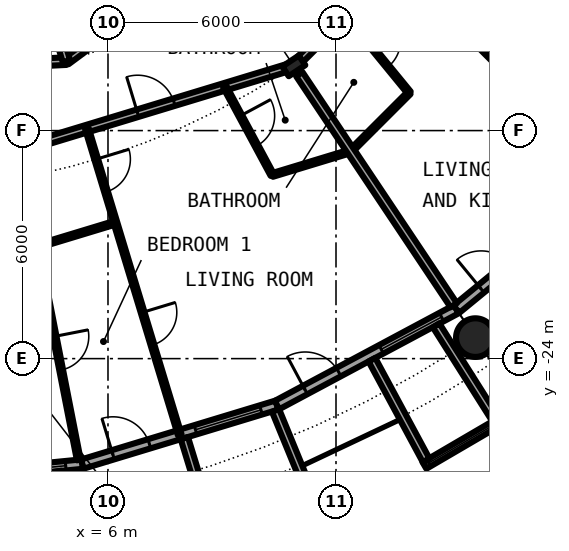
"""IFC4 building model, lengths in metres.
Left out: names, types, materials, properties, quantities, classifications, styles, units other than length and angle.
Written with IfcOpenShell. Run it as: python <this file> out.ifc"""

import sys

from ifc_helpers import new_model, si_unit, direction, frame, frame_2d, origin, origin_2d, place, context, subcontext, project, spatial, rectangle, circle, hollow_circle, i_section, extrude, element, fill, save


model = new_model("IFC4")
c1 = context("Model", 3, precision=1e-05, world=origin(), true_north=direction((0.0, 1.0)))
c2 = subcontext(c1, "Body", "Model", "MODEL_VIEW")
j1 = project(units=[si_unit("LENGTHUNIT", "METRE"), si_unit("PLANEANGLEUNIT", "RADIAN")], contexts=[c1])
p1 = place(None, origin())
s1 = spatial("IfcSite", under=j1, at=p1, CompositionType="ELEMENT")
p2 = place(p1, origin())
s2 = spatial("IfcBuilding", under=s1, at=p2, CompositionType="ELEMENT")
p3 = place(p2, frame((0.0, 0.0, 88.0)))
s3 = spatial("IfcBuildingStorey", under=s2, at=p3, CompositionType="ELEMENT", Elevation=88.0)
p4 = place(p3, frame((15.667, -23.448, 0.0), z_axis=(0.0, 0.0, 1.0), x_axis=(1.0, 0.0, 0.0)))
e1 = element("IfcColumn", 1, at=p4, inside=s3, PredefinedType="COLUMN", context=c2, shape_type="SweptSolid", body=[
    extrude(hollow_circle(Radius=0.508, WallThickness=0.04, at=origin_2d()), origin(), (0.0, 0.0, 1.0), 3.05),
])
p5 = place(p3, frame((10.889, -16.297, 0.0), z_axis=(0.0, 0.0, 1.0), x_axis=(0.55557023302, -0.831469612303, 0.0)))
e2 = element("IfcColumn", 2, at=p5, inside=s3, PredefinedType="COLUMN", context=c2, shape_type="SweptSolid", body=[
    extrude(i_section(OverallWidth=0.306, OverallDepth=0.524, WebThickness=0.021, FlangeThickness=0.04, FilletRadius=0.027, at=origin_2d()), origin(), (0.0, 0.0, 1.0), 3.05),
])
p6 = place(p3, frame((0.0, -27.3, 0.0), z_axis=(0.0, 0.0, 1.0), x_axis=(0.995173996315, 0.098126026407, 0.0)))
e3 = element("IfcWall", 3, at=p6, inside=s3, PredefinedType="SOLIDWALL", context=c2, shape_type="SweptSolid", body=[
    extrude(rectangle(XDim=5.352, YDim=0.25, at=frame_2d((2.676, 0.0))), origin(), (0.0, 0.0, 1.0), 2.7),
])
p7 = place(p6, frame((0.841, 0.0, 0.0)))
e4 = element("IfcOpeningElement", 4, at=p7, cuts=e3, PredefinedType="OPENING", context=c2, shape_type="SweptSolid", body=[
    extrude(rectangle(XDim=1.0, YDim=2.2, at=frame_2d((0.5, 1.1))), frame((0.0, 0.135, 0.0), z_axis=(0.0, -1.0, 0.0), x_axis=(1.0, 0.0, 0.0)), (0.0, 0.0, 1.0), 0.27),
])
p8 = place(p6, frame((3.111, 0.0, 0.3)))
e5 = element("IfcOpeningElement", 5, at=p8, cuts=e3, PredefinedType="OPENING", context=c2, shape_type="SweptSolid", body=[
    extrude(rectangle(XDim=1.8, YDim=2.1, at=frame_2d((0.9, 1.05))), frame((0.0, 0.135, 0.0), z_axis=(0.0, -1.0, 0.0), x_axis=(1.0, 0.0, 0.0)), (0.0, 0.0, 1.0), 0.27),
])
p9 = place(p3, frame((4.671, -26.966, -0.03), z_axis=(0.0, 0.0, 1.0), x_axis=(0.170539878907, -0.985350774954, 0.0)))
e6 = element("IfcWall", 6, at=p9, inside=s3, PredefinedType="SOLIDWALL", context=c2, shape_type="SweptSolid", body=[
    extrude(rectangle(XDim=2.932, YDim=0.2, at=frame_2d((1.466, 0.0))), origin(), (0.0, 0.0, 1.0), 2.73),
])
p10 = place(p3, frame((5.326, -26.775, 0.0), z_axis=(0.0, 0.0, 1.0), x_axis=(0.956965678721, 0.290201119486, 0.0)))
e7 = element("IfcWall", 7, at=p10, inside=s3, PredefinedType="SOLIDWALL", context=c2, shape_type="SweptSolid", body=[
    extrude(rectangle(XDim=5.351, YDim=0.25, at=frame_2d((2.676, 0.0))), origin(), (0.0, 0.0, 1.0), 2.7),
])
p11 = place(p10, frame((0.841, 0.0, 0.0)))
e8 = element("IfcOpeningElement", 8, at=p11, cuts=e7, PredefinedType="OPENING", context=c2, shape_type="SweptSolid", body=[
    extrude(rectangle(XDim=1.0, YDim=2.2, at=frame_2d((0.5, 1.1))), frame((0.0, 0.135, 0.0), z_axis=(0.0, -1.0, 0.0), x_axis=(1.0, 0.0, 0.0)), (0.0, 0.0, 1.0), 0.27),
])
p12 = place(p10, frame((3.111, 0.0, 0.3)))
e9 = element("IfcOpeningElement", 9, at=p12, cuts=e7, PredefinedType="OPENING", context=c2, shape_type="SweptSolid", body=[
    extrude(rectangle(XDim=1.8, YDim=2.1, at=frame_2d((0.9, 1.05))), frame((0.0, 0.135, 0.0), z_axis=(0.0, -1.0, 0.0), x_axis=(1.0, 0.0, 0.0)), (0.0, 0.0, 1.0), 0.27),
])
p13 = place(p3, frame((8.009, -26.092, -0.03), z_axis=(0.0, 0.0, 1.0), x_axis=(0.293406695073, -0.955987715029, 0.0)))
e10 = element("IfcWall", 10, at=p13, inside=s3, PredefinedType="SOLIDWALL", context=c2, shape_type="SweptSolid", body=[
    extrude(rectangle(XDim=3.006, YDim=0.2, at=frame_2d((1.503, 0.0))), origin(), (0.0, 0.0, 1.0), 2.73),
])
p14 = place(p3, frame((10.409, -25.364, -0.03), z_axis=(0.0, 0.0, 1.0), x_axis=(0.379509886562, -0.925187681501, 0.0)))
e11 = element("IfcWall", 11, at=p14, inside=s3, PredefinedType="SOLIDWALL", context=c2, shape_type="SweptSolid", body=[
    extrude(rectangle(XDim=2.883, YDim=0.2, at=frame_2d((1.441, 0.0))), origin(), (0.0, 0.0, 1.0), 2.73),
])
p15 = place(p3, frame((10.447, -25.222, 0.0), z_axis=(0.0, 0.0, 1.0), x_axis=(0.881915646801, 0.471407246368, 0.0)))
e12 = element("IfcWall", 12, at=p15, inside=s3, PredefinedType="SOLIDWALL", context=c2, shape_type="SweptSolid", body=[
    extrude(rectangle(XDim=5.352, YDim=0.25, at=frame_2d((2.676, 0.0))), origin(), (0.0, 0.0, 1.0), 2.7),
])
p16 = place(p15, frame((0.841, 0.0, 0.0)))
e13 = element("IfcOpeningElement", 13, at=p16, cuts=e12, PredefinedType="OPENING", context=c2, shape_type="SweptSolid", body=[
    extrude(rectangle(XDim=1.0, YDim=2.2, at=frame_2d((0.5, 1.1))), frame((0.0, 0.135, 0.0), z_axis=(0.0, -1.0, 0.0), x_axis=(1.0, 0.0, 0.0)), (0.0, 0.0, 1.0), 0.27),
])
p17 = place(p15, frame((3.111, 0.0, 0.3)))
e14 = element("IfcOpeningElement", 14, at=p17, cuts=e12, PredefinedType="OPENING", context=c2, shape_type="SweptSolid", body=[
    extrude(rectangle(XDim=1.8, YDim=2.1, at=frame_2d((0.9, 1.05))), frame((0.0, 0.135, 0.0), z_axis=(0.0, -1.0, 0.0), x_axis=(1.0, 0.0, 0.0)), (0.0, 0.0, 1.0), 0.27),
])
p18 = place(p3, frame((14.327, -26.812, -0.03), z_axis=(0.0, 0.0, 1.0), x_axis=(0.863346521872, 0.504611517081, 0.0)))
e15 = element("IfcWall", 15, at=p18, inside=s3, PredefinedType="SOLIDWALL", context=c2, shape_type="SweptSolid", body=[
    extrude(rectangle(XDim=2.336, YDim=0.2, at=frame_2d((1.168, 0.0))), origin(), (0.0, 0.0, 1.0), 2.73),
])
p19 = place(p18, frame((0.128, 0.0, 0.33)))
e16 = element("IfcOpeningElement", 16, at=p19, cuts=e15, PredefinedType="OPENING", context=c2, shape_type="SweptSolid", body=[
    extrude(circle(Radius=1.04, at=frame_2d((1.04, 1.04))), frame((0.0, 0.11, 0.0), z_axis=(0.0, -1.0, 0.0), x_axis=(1.0, 0.0, 0.0)), (0.0, 0.0, 1.0), 0.22),
])
p20 = place(p3, frame((12.945, -24.029, -0.03), z_axis=(0.0, 0.0, 1.0), x_axis=(0.474424310775, -0.88029629861, 0.0)))
e17 = element("IfcWall", 17, at=p20, inside=s3, PredefinedType="SOLIDWALL", context=c2, shape_type="SweptSolid", body=[
    extrude(rectangle(XDim=3.006, YDim=0.2, at=frame_2d((1.503, 0.0))), origin(), (0.0, 0.0, 1.0), 2.73),
])
p21 = place(p3, frame((14.635, -23.126, -0.03), z_axis=(0.0, 0.0, 1.0), x_axis=(0.534437802731, -0.845207805816, 0.0)))
e18 = element("IfcWall", 18, at=p21, inside=s3, PredefinedType="SOLIDWALL", context=c2, shape_type="SweptSolid", body=[
    extrude(rectangle(XDim=2.932, YDim=0.2, at=frame_2d((1.466, 0.0))), origin(), (0.0, 0.0, 1.0), 2.73),
])
p22 = place(p3, frame((15.167, -22.699, 0.0), z_axis=(0.0, 0.0, 1.0), x_axis=(0.773019449054, 0.634382322723, 0.0)))
e19 = element("IfcWall", 19, at=p22, inside=s3, PredefinedType="SOLIDWALL", context=c2, shape_type="SweptSolid", body=[
    extrude(rectangle(XDim=5.352, YDim=0.25, at=frame_2d((2.676, 0.0))), origin(), (0.0, 0.0, 1.0), 2.7),
])
p23 = place(p22, frame((0.841, 0.0, 0.0)))
e20 = element("IfcOpeningElement", 20, at=p23, cuts=e19, PredefinedType="OPENING", context=c2, shape_type="SweptSolid", body=[
    extrude(rectangle(XDim=1.0, YDim=2.2, at=frame_2d((0.5, 1.1))), frame((0.0, 0.135, 0.0), z_axis=(0.0, -1.0, 0.0), x_axis=(1.0, 0.0, 0.0)), (0.0, 0.0, 1.0), 0.27),
])
p24 = place(p22, frame((3.111, 0.0, 0.3)))
e21 = element("IfcOpeningElement", 21, at=p24, cuts=e19, PredefinedType="OPENING", context=c2, shape_type="SweptSolid", body=[
    extrude(rectangle(XDim=1.8, YDim=2.1, at=frame_2d((0.9, 1.05))), frame((0.0, 0.135, 0.0), z_axis=(0.0, -1.0, 0.0), x_axis=(1.0, 0.0, 0.0)), (0.0, 0.0, 1.0), 0.27),
])
p25 = place(p3, frame((12.389, -18.542, 0.0), z_axis=(0.0, 0.0, 1.0), x_axis=(0.707106781187, 0.707106781187, 0.0)))
e22 = element("IfcWall", 22, at=p25, inside=s3, PredefinedType="PARTITIONING", context=c2, shape_type="SweptSolid", body=[
    extrude(rectangle(XDim=2.175, YDim=0.1, at=frame_2d((1.088, 0.0))), origin(), (0.0, 0.0, 1.0), 2.7),
])
p26 = place(p3, frame((0.0, -22.3, 0.0), z_axis=(0.0, 0.0, 1.0), x_axis=(0.956940987612, 0.290282528286, 0.0)))
e23 = element("IfcWall", 23, at=p26, inside=s3, PredefinedType="PARTITIONING", context=c2, shape_type="SweptSolid", body=[
    extrude(rectangle(XDim=6.477, YDim=0.1, at=frame_2d((3.238, 0.0))), origin(), (0.0, 0.0, 1.0), 2.7),
])
p27 = place(p3, frame((10.327, -19.168, 0.0), z_axis=(0.0, 0.0, 1.0), x_axis=(0.956877769253, 0.290490851335, 0.0)))
e24 = element("IfcWall", 24, at=p27, inside=s3, PredefinedType="PARTITIONING", context=c2, shape_type="SweptSolid", body=[
    extrude(rectangle(XDim=2.158, YDim=0.1, at=frame_2d((1.079, 0.0))), origin(), (0.0, 0.0, 1.0), 2.7),
])
p28 = place(p3, frame((11.0, -16.186, 0.0), z_axis=(0.0, 0.0, 1.0), x_axis=(0.707106781187, 0.707106781187, 0.0)))
e25 = element("IfcWall", 25, at=p28, inside=s3, PredefinedType="PARTITIONING", context=c2, shape_type="SweptSolid", body=[
    extrude(rectangle(XDim=7.334, YDim=0.2, at=frame_2d((3.667, 0.0))), origin(), (0.0, 0.0, 1.0), 2.38),
])
p29 = place(p28, frame((4.123, 0.0, 0.0)))
e26 = element("IfcOpeningElement", 26, at=p29, cuts=e25, PredefinedType="OPENING", context=c2, shape_type="SweptSolid", body=[
    extrude(rectangle(XDim=1.0, YDim=2.3, at=frame_2d((0.5, 1.15))), frame((0.0, 0.11, 0.0), z_axis=(0.0, -1.0, 0.0), x_axis=(1.0, 0.0, 0.0)), (0.0, 0.0, 1.0), 0.22),
])
p30 = place(p3, frame((0.0, -19.6, 0.0), z_axis=(0.0, 0.0, 1.0), x_axis=(0.956932298225, 0.290311172044, 0.0)))
e27 = element("IfcWall", 27, at=p30, inside=s3, PredefinedType="PARTITIONING", context=c2, shape_type="SweptSolid", body=[
    extrude(rectangle(XDim=11.219, YDim=0.2, at=frame_2d((5.61, 0.0))), origin(), (0.0, 0.0, 1.0), 2.38),
])
p31 = place(p30, frame((7.086, 0.0, 0.0)))
e28 = element("IfcOpeningElement", 28, at=p31, cuts=e27, PredefinedType="OPENING", context=c2, shape_type="SweptSolid", body=[
    extrude(rectangle(XDim=1.0, YDim=2.3, at=frame_2d((0.5, 1.15))), frame((0.0, 0.11, 0.0), z_axis=(0.0, -1.0, 0.0), x_axis=(1.0, 0.0, 0.0)), (0.0, 0.0, 1.0), 0.22),
])
p32 = place(p3, frame((-3.297, -16.575, 0.0), z_axis=(0.0, 0.0, 1.0), x_axis=(0.998796706656, 0.0490422142, 0.0)))
e29 = element("IfcWall", 29, at=p32, inside=s3, PredefinedType="PARTITIONING", context=c2, shape_type="SweptSolid", body=[
    extrude(rectangle(XDim=8.214, YDim=0.2, at=frame_2d((4.107, 0.0))), origin(), (0.0, 0.0, 1.0), 2.7),
])
p33 = place(p32, frame((3.614, 0.0, 0.0)))
e30 = element("IfcOpeningElement", 30, at=p33, cuts=e29, PredefinedType="OPENING", context=c2, shape_type="SweptSolid", body=[
    extrude(rectangle(XDim=1.0, YDim=2.3, at=frame_2d((0.5, 1.15))), frame((0.0, 0.11, 0.0), z_axis=(0.0, -1.0, 0.0), x_axis=(1.0, 0.0, 0.0)), (0.0, 0.0, 1.0), 0.22),
])
p34 = place(p3, frame((4.906, -16.172, 0.0), z_axis=(0.0, 0.0, 1.0), x_axis=(0.803191461888, 0.595720971219, 0.0)))
e31 = element("IfcWall", 31, at=p34, inside=s3, PredefinedType="PARTITIONING", context=c2, shape_type="SweptSolid", body=[
    extrude(rectangle(XDim=9.76, YDim=0.2, at=frame_2d((4.88, 0.0))), origin(), (0.0, 0.0, 1.0), 2.7),
])
p35 = place(p34, frame((4.38, 0.0, 0.0)))
e32 = element("IfcOpeningElement", 32, at=p35, cuts=e31, PredefinedType="OPENING", context=c2, shape_type="SweptSolid", body=[
    extrude(rectangle(XDim=1.0, YDim=2.3, at=frame_2d((0.5, 1.15))), frame((0.0, 0.11, 0.0), z_axis=(0.0, -1.0, 0.0), x_axis=(1.0, 0.0, 0.0)), (0.0, 0.0, 1.0), 0.22),
])
p36 = place(p3, frame((2.242, -7.388, 0.0), z_axis=(0.0, 0.0, 1.0), x_axis=(0.290225889812, -0.956958166736, 0.0)))
e33 = element("IfcWall", 33, at=p36, inside=s3, PredefinedType="PARTITIONING", context=c2, shape_type="SweptSolid", body=[
    extrude(rectangle(XDim=9.179, YDim=0.2, at=frame_2d((4.59, 0.0))), origin(), (0.0, 0.0, 1.0), 2.7),
])
p37 = place(p3, frame((4.13, -21.047, 0.0), z_axis=(0.0, 0.0, 1.0), x_axis=(0.192433779325, -0.981309961518, 0.0)))
e34 = element("IfcWall", 34, at=p37, inside=s3, PredefinedType="PARTITIONING", context=c2, shape_type="SweptSolid", body=[
    extrude(rectangle(XDim=5.727, YDim=0.1, at=frame_2d((2.863, 0.0))), origin(), (0.0, 0.0, 1.0), 2.7),
])
p38 = place(p37, frame((2.414, 0.0, 0.0)))
e35 = element("IfcOpeningElement", 35, at=p38, cuts=e34, PredefinedType="OPENING", context=c2, shape_type="SweptSolid", body=[
    extrude(rectangle(XDim=0.9, YDim=2.3, at=frame_2d((0.45, 1.15))), frame((0.0, 0.06, 0.0), z_axis=(0.0, -1.0, 0.0), x_axis=(1.0, 0.0, 0.0)), (0.0, 0.0, 1.0), 0.12),
])
p39 = place(p3, frame((5.445, -17.948, 0.0), z_axis=(0.0, 0.0, 1.0), x_axis=(0.290158700753, -0.956978541231, 0.0)))
e36 = element("IfcWall", 36, at=p39, inside=s3, PredefinedType="PARTITIONING", context=c2, shape_type="SweptSolid", body=[
    extrude(rectangle(XDim=8.419, YDim=0.1, at=frame_2d((4.209, 0.0))), origin(), (0.0, 0.0, 1.0), 2.7),
])
p40 = place(p39, frame((0.842, 0.0, 0.0)))
e37 = element("IfcOpeningElement", 37, at=p40, cuts=e36, PredefinedType="OPENING", context=c2, shape_type="SweptSolid", body=[
    extrude(rectangle(XDim=0.9, YDim=2.3, at=frame_2d((0.45, 1.15))), frame((0.0, 0.06, 0.0), z_axis=(0.0, -1.0, 0.0), x_axis=(1.0, 0.0, 0.0)), (0.0, 0.0, 1.0), 0.12),
])
p41 = place(p39, frame((5.052, 0.0, 0.0)))
e38 = element("IfcOpeningElement", 38, at=p41, cuts=e36, PredefinedType="OPENING", context=c2, shape_type="SweptSolid", body=[
    extrude(rectangle(XDim=0.9, YDim=2.3, at=frame_2d((0.45, 1.15))), frame((0.0, 0.06, 0.0), z_axis=(0.0, -1.0, 0.0), x_axis=(1.0, 0.0, 0.0)), (0.0, 0.0, 1.0), 0.12),
])
p42 = place(p3, frame((9.074, -16.847, 0.0), z_axis=(0.0, 0.0, 1.0), x_axis=(0.474160570331, -0.880438387136, 0.0)))
e39 = element("IfcWall", 39, at=p42, inside=s3, PredefinedType="PARTITIONING", context=c2, shape_type="SweptSolid", body=[
    extrude(rectangle(XDim=2.636, YDim=0.1, at=frame_2d((1.318, 0.0))), origin(), (0.0, 0.0, 1.0), 2.7),
])
p43 = place(p42, frame((0.868, 0.0, 0.0)))
e40 = element("IfcOpeningElement", 40, at=p43, cuts=e39, PredefinedType="OPENING", context=c2, shape_type="SweptSolid", body=[
    extrude(rectangle(XDim=0.9, YDim=2.3, at=frame_2d((0.45, 1.15))), frame((0.0, 0.06, 0.0), z_axis=(0.0, -1.0, 0.0), x_axis=(1.0, 0.0, 0.0)), (0.0, 0.0, 1.0), 0.12),
])
p44 = place(p3, frame((11.034, -16.515, 0.0), z_axis=(0.0, 0.0, 1.0), x_axis=(0.555701298605, -0.831382022135, 0.0)))
e41 = element("IfcWall", 41, at=p44, inside=s3, PredefinedType="PARTITIONING", context=c2, shape_type="SweptSolid", body=[
    extrude(rectangle(XDim=7.313, YDim=0.2, at=frame_2d((3.657, 0.0))), origin(), (0.0, 0.0, 1.0), 2.7),
])
p45 = place(p3, frame((12.241, -14.945, 0.0), z_axis=(0.0, 0.0, 1.0), x_axis=(0.633582447834, -0.77367517848, 0.0)))
e42 = element("IfcWall", 42, at=p45, inside=s3, PredefinedType="PARTITIONING", context=c2, shape_type="SweptSolid", body=[
    extrude(rectangle(XDim=2.661, YDim=0.1, at=frame_2d((1.331, 0.0))), origin(), (0.0, 0.0, 1.0), 2.7),
])
p46 = place(p45, frame((0.881, 0.0, 0.0)))
e43 = element("IfcOpeningElement", 43, at=p46, cuts=e42, PredefinedType="OPENING", context=c2, shape_type="SweptSolid", body=[
    extrude(rectangle(XDim=0.9, YDim=2.3, at=frame_2d((0.45, 1.15))), frame((0.0, 0.06, 0.0), z_axis=(0.0, -1.0, 0.0), x_axis=(1.0, 0.0, 0.0)), (0.0, 0.0, 1.0), 0.12),
])
p47 = place(p3, frame((15.465, -15.465, 0.0), z_axis=(0.0, 0.0, 1.0), x_axis=(0.707106781187, -0.707106781187, 0.0)))
e44 = element("IfcWall", 44, at=p47, inside=s3, PredefinedType="PARTITIONING", context=c2, shape_type="SweptSolid", body=[
    extrude(rectangle(XDim=5.305, YDim=0.1, at=frame_2d((2.652, 0.0))), origin(), (0.0, 0.0, 1.0), 2.7),
])
p48 = place(p47, frame((2.202, 0.0, 0.0)))
e45 = element("IfcOpeningElement", 45, at=p48, cuts=e44, PredefinedType="OPENING", context=c2, shape_type="SweptSolid", body=[
    extrude(rectangle(XDim=0.9, YDim=2.3, at=frame_2d((0.45, 1.15))), frame((0.0, 0.06, 0.0), z_axis=(0.0, -1.0, 0.0), x_axis=(1.0, 0.0, 0.0)), (0.0, 0.0, 1.0), 0.12),
])
p49 = place(p8, origin())
e46 = element("IfcWindow", 46, at=p49, inside=s3, PartitioningType="SINGLE_PANEL", PredefinedType="WINDOW", context=c2, shape_type="SweptSolid", body=[
    extrude(rectangle(XDim=1.8, YDim=2.1, at=frame_2d((0.9, 1.05))), frame((0.0, 0.03, 0.0), z_axis=(0.0, -1.0, 0.0), x_axis=(1.0, 0.0, 0.0)), (0.0, 0.0, 1.0), 0.06),
])
fill(e5, e46)
p50 = place(p11, origin())
e47 = element("IfcDoor", 47, at=p50, inside=s3, OperationType="SINGLE_SWING_LEFT", PredefinedType="DOOR", context=c2, shape_type="SweptSolid", body=[
    extrude(rectangle(XDim=1.0, YDim=2.2, at=frame_2d((0.5, 1.1))), frame((0.0, 0.025, 0.0), z_axis=(0.0, -1.0, 0.0), x_axis=(1.0, 0.0, 0.0)), (0.0, 0.0, 1.0), 0.05),
])
fill(e8, e47)
p51 = place(p12, origin())
e48 = element("IfcWindow", 48, at=p51, inside=s3, PartitioningType="SINGLE_PANEL", PredefinedType="WINDOW", context=c2, shape_type="SweptSolid", body=[
    extrude(rectangle(XDim=1.8, YDim=2.1, at=frame_2d((0.9, 1.05))), frame((0.0, 0.03, 0.0), z_axis=(0.0, -1.0, 0.0), x_axis=(1.0, 0.0, 0.0)), (0.0, 0.0, 1.0), 0.06),
])
fill(e9, e48)
p52 = place(p16, origin())
e49 = element("IfcDoor", 49, at=p52, inside=s3, OperationType="SINGLE_SWING_LEFT", PredefinedType="DOOR", context=c2, shape_type="SweptSolid", body=[
    extrude(rectangle(XDim=1.0, YDim=2.2, at=frame_2d((0.5, 1.1))), frame((0.0, 0.025, 0.0), z_axis=(0.0, -1.0, 0.0), x_axis=(1.0, 0.0, 0.0)), (0.0, 0.0, 1.0), 0.05),
])
fill(e13, e49)
p53 = place(p17, origin())
e50 = element("IfcWindow", 50, at=p53, inside=s3, PartitioningType="SINGLE_PANEL", PredefinedType="WINDOW", context=c2, shape_type="SweptSolid", body=[
    extrude(rectangle(XDim=1.8, YDim=2.1, at=frame_2d((0.9, 1.05))), frame((0.0, 0.03, 0.0), z_axis=(0.0, -1.0, 0.0), x_axis=(1.0, 0.0, 0.0)), (0.0, 0.0, 1.0), 0.06),
])
fill(e14, e50)
p54 = place(p19, origin())
e51 = element("IfcWindow", 51, at=p54, inside=s3, PartitioningType="SINGLE_PANEL", PredefinedType="WINDOW", context=c2, shape_type="SweptSolid", body=[
    extrude(circle(Radius=1.04, at=frame_2d((1.04, 1.04))), frame((0.0, 0.03, 0.0), z_axis=(0.0, -1.0, 0.0), x_axis=(1.0, 0.0, 0.0)), (0.0, 0.0, 1.0), 0.06),
])
fill(e16, e51)
p55 = place(p23, origin())
e52 = element("IfcDoor", 52, at=p55, inside=s3, OperationType="SINGLE_SWING_LEFT", PredefinedType="DOOR", context=c2, shape_type="SweptSolid", body=[
    extrude(rectangle(XDim=1.0, YDim=2.2, at=frame_2d((0.5, 1.1))), frame((0.0, 0.025, 0.0), z_axis=(0.0, -1.0, 0.0), x_axis=(1.0, 0.0, 0.0)), (0.0, 0.0, 1.0), 0.05),
])
fill(e20, e52)
p56 = place(p31, origin())
e53 = element("IfcDoor", 53, at=p56, inside=s3, OperationType="SINGLE_SWING_RIGHT", PredefinedType="DOOR", context=c2, shape_type="SweptSolid", body=[
    extrude(rectangle(XDim=1.0, YDim=2.3, at=frame_2d((0.5, 1.15))), frame((0.0, 0.025, 0.0), z_axis=(0.0, -1.0, 0.0), x_axis=(1.0, 0.0, 0.0)), (0.0, 0.0, 1.0), 0.05),
])
fill(e28, e53)
p57 = place(p43, origin())
e54 = element("IfcDoor", 54, at=p57, inside=s3, OperationType="SINGLE_SWING_RIGHT", PredefinedType="DOOR", context=c2, shape_type="SweptSolid", body=[
    extrude(rectangle(XDim=0.9, YDim=2.3, at=frame_2d((0.45, 1.15))), frame((0.0, 0.025, 0.0), z_axis=(0.0, -1.0, 0.0), x_axis=(1.0, 0.0, 0.0)), (0.0, 0.0, 1.0), 0.05),
])
fill(e40, e54)
p58 = place(p40, origin())
e55 = element("IfcDoor", 55, at=p58, inside=s3, OperationType="SINGLE_SWING_LEFT", PredefinedType="DOOR", context=c2, shape_type="SweptSolid", body=[
    extrude(rectangle(XDim=0.9, YDim=2.3, at=frame_2d((0.45, 1.15))), frame((0.0, 0.025, 0.0), z_axis=(0.0, -1.0, 0.0), x_axis=(1.0, 0.0, 0.0)), (0.0, 0.0, 1.0), 0.05),
])
fill(e37, e55)
p59 = place(p41, origin())
e56 = element("IfcDoor", 56, at=p59, inside=s3, OperationType="SINGLE_SWING_RIGHT", PredefinedType="DOOR", context=c2, shape_type="SweptSolid", body=[
    extrude(rectangle(XDim=0.9, YDim=2.3, at=frame_2d((0.45, 1.15))), frame((0.0, 0.025, 0.0), z_axis=(0.0, -1.0, 0.0), x_axis=(1.0, 0.0, 0.0)), (0.0, 0.0, 1.0), 0.05),
])
fill(e38, e56)
p60 = place(p38, origin())
e57 = element("IfcDoor", 57, at=p60, inside=s3, OperationType="SINGLE_SWING_RIGHT", PredefinedType="DOOR", context=c2, shape_type="SweptSolid", body=[
    extrude(rectangle(XDim=0.9, YDim=2.3, at=frame_2d((0.45, 1.15))), frame((0.0, 0.025, 0.0), z_axis=(0.0, -1.0, 0.0), x_axis=(1.0, 0.0, 0.0)), (0.0, 0.0, 1.0), 0.05),
])
fill(e35, e57)
p61 = place(p46, origin())
e58 = element("IfcDoor", 58, at=p61, inside=s3, OperationType="SINGLE_SWING_LEFT", PredefinedType="DOOR", context=c2, shape_type="SweptSolid", body=[
    extrude(rectangle(XDim=0.9, YDim=2.3, at=frame_2d((0.45, 1.15))), frame((0.0, 0.025, 0.0), z_axis=(0.0, -1.0, 0.0), x_axis=(1.0, 0.0, 0.0)), (0.0, 0.0, 1.0), 0.05),
])
fill(e43, e58)
save(model, sys.argv[1])
